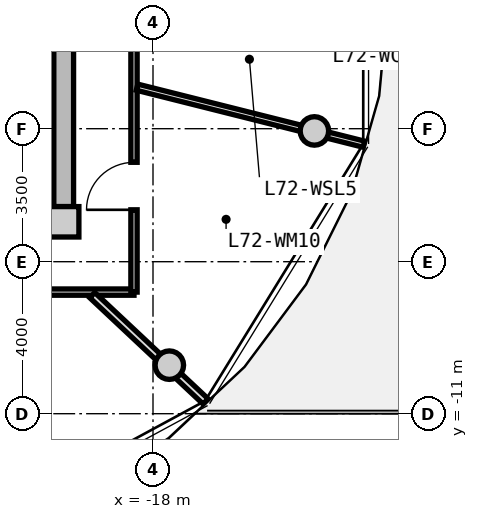
"""IFC4 building model, lengths in metres.
Left out: names, types, materials, properties, quantities, classifications, styles, units other than length and angle.
Written with IfcOpenShell. Run it as: python <this file> out.ifc"""

import sys

from ifc_helpers import new_model, si_unit, direction, frame, frame_2d, origin, origin_2d, place, context, subcontext, project, spatial, rectangle, circle, extrude, source, transform, mapped, element, fill, save


model = new_model("IFC4")
c1 = context("Model", 3, precision=1e-05, world=origin(), true_north=direction((0.0, 1.0)))
c2 = subcontext(c1, "Body", "Model", "MODEL_VIEW")
j1 = project(units=[si_unit("LENGTHUNIT", "METRE"), si_unit("PLANEANGLEUNIT", "RADIAN")], contexts=[c1])
p1 = place(None, origin())
s1 = spatial("IfcSite", under=j1, at=p1, CompositionType="ELEMENT")
p2 = place(p1, origin())
s2 = spatial("IfcBuilding", under=s1, at=p2, CompositionType="ELEMENT")
p3 = place(p2, frame((0.0, 0.0, 232.2)))
s3 = spatial("IfcBuildingStorey", under=s2, at=p3, CompositionType="ELEMENT", Elevation=232.2)
m1 = source(origin(), c2, "Body", "SweptSolid", [
    extrude(rectangle(XDim=0.8, YDim=0.8, at=origin_2d()), origin(), (0.0, 0.0, 1.0), 3.05),
])
p4 = place(p3, frame((-20.35, -5.95, 0.0), z_axis=(0.0, 0.0, 1.0), x_axis=(1.0, 0.0, 0.0)))
e1 = element("IfcColumn", 1, at=p4, inside=s3, PredefinedType="COLUMN", context=c2, shape_type="MappedRepresentation", body=[
    mapped(m1, transform((0.0, 0.0, 0.0), x_axis=(1.0, 0.0, 0.0), y_axis=(0.0, 1.0, 0.0), z_axis=(0.0, 0.0, 1.0), scale=1.0)),
])
m2 = source(origin(), c2, "Body", "SweptSolid", [
    extrude(rectangle(XDim=11.1, YDim=0.52, at=frame_2d((5.55, 0.0))), origin(), (0.0, 0.0, 1.0), 2.81),
])
p5 = place(p3, frame((-20.35, 5.55, 0.0), z_axis=(0.0, 0.0, 1.0), x_axis=(0.0, -1.0, 0.0)))
e2 = element("IfcWall", 2, at=p5, inside=s3, PredefinedType="SHEAR", context=c2, shape_type="MappedRepresentation", body=[
    mapped(m2, transform((0.0, 0.0, 0.0), x_axis=(1.0, 0.0, 0.0), y_axis=(0.0, 1.0, 0.0), z_axis=(0.0, 0.0, 1.0), scale=1.0)),
])
p6 = place(p5, frame((5.65, 0.0, 0.0)))
e3 = element("IfcOpeningElement", 3, at=p6, cuts=e2, PredefinedType="OPENING", context=c2, shape_type="SweptSolid", body=[
    extrude(rectangle(XDim=1.2, YDim=2.15, at=frame_2d((0.6, 1.075))), frame((0.0, 0.27, 0.0), z_axis=(0.0, -1.0, 0.0), x_axis=(1.0, 0.0, 0.0)), (0.0, 0.0, 1.0), 0.54),
])
m3 = source(origin(), c2, "Body", "SweptSolid", [
    extrude(circle(Radius=0.375, at=origin_2d()), origin(), (0.0, 0.0, 1.0), 3.05),
])
for number, where, z_axis, x_axis in (
    (4, (-17.57, -9.723, 0.0), (0.0, 0.0, 1.0), (1.0, 0.0, 0.0)),
    (5, (-13.753, -3.559, 0.0), (0.0, 0.0, 1.0), (1.0, 0.0, 0.0)),
):
    element("IfcColumn", number, at=place(p3, frame(where, z_axis=z_axis, x_axis=x_axis)), inside=s3, PredefinedType="COLUMN", context=c2, shape_type="MappedRepresentation", body=[
        mapped(m3, transform((0.0, 0.0, 0.0), x_axis=(1.0, 0.0, 0.0), y_axis=(0.0, 1.0, 0.0), z_axis=(0.0, 0.0, 1.0), scale=1.0)),
    ])
m4 = source(origin(), c2, "Body", "SweptSolid", [
    extrude(rectangle(XDim=19.0, YDim=0.165, at=frame_2d((9.5, 0.0))), origin(), (0.0, 0.0, 1.0), 2.795),
])
p7 = place(p3, frame((-18.5, -7.8, 0.0), z_axis=(0.0, 0.0, 1.0), x_axis=(-1.0, 0.0, 0.0)))
e6 = element("IfcWall", 6, at=p7, inside=s3, PredefinedType="PARTITIONING", context=c2, shape_type="MappedRepresentation", body=[
    mapped(m4, transform((0.0, 0.0, 0.0), x_axis=(1.0, 0.0, 0.0), y_axis=(0.0, 1.0, 0.0), z_axis=(0.0, 0.0, 1.0), scale=1.0)),
])
p8 = place(p7, frame((15.586, 0.0, 0.0)))
e7 = element("IfcOpeningElement", 7, at=p8, cuts=e6, PredefinedType="OPENING", context=c2, shape_type="SweptSolid", body=[
    extrude(rectangle(XDim=1.05, YDim=2.15, at=frame_2d((0.525, 1.075))), frame((0.0, 0.093, 0.0), z_axis=(0.0, -1.0, 0.0), x_axis=(1.0, 0.0, 0.0)), (0.0, 0.0, 1.0), 0.185),
])
p9 = place(p7, frame((12.465, 0.0, 0.0)))
e8 = element("IfcOpeningElement", 8, at=p9, cuts=e6, PredefinedType="OPENING", context=c2, shape_type="SweptSolid", body=[
    extrude(rectangle(XDim=1.05, YDim=2.15, at=frame_2d((0.525, 1.075))), frame((0.0, 0.093, 0.0), z_axis=(0.0, -1.0, 0.0), x_axis=(1.0, 0.0, 0.0)), (0.0, 0.0, 1.0), 0.185),
])
p10 = place(p7, frame((8.875, 0.0, 0.0)))
e9 = element("IfcOpeningElement", 9, at=p10, cuts=e6, PredefinedType="OPENING", context=c2, shape_type="SweptSolid", body=[
    extrude(rectangle(XDim=1.25, YDim=2.2, at=frame_2d((0.625, 1.1))), frame((0.0, 0.093, 0.0), z_axis=(0.0, -1.0, 0.0), x_axis=(1.0, 0.0, 0.0)), (0.0, 0.0, 1.0), 0.185),
])
p11 = place(p7, frame((3.559, 0.0, 0.0)))
e10 = element("IfcOpeningElement", 10, at=p11, cuts=e6, PredefinedType="OPENING", context=c2, shape_type="SweptSolid", body=[
    extrude(rectangle(XDim=1.25, YDim=2.2, at=frame_2d((0.625, 1.1))), frame((0.0, 0.093, 0.0), z_axis=(0.0, -1.0, 0.0), x_axis=(1.0, 0.0, 0.0)), (0.0, 0.0, 1.0), 0.185),
])
m5 = source(origin(), c2, "Body", "SweptSolid", [
    extrude(rectangle(XDim=6.88, YDim=0.165, at=frame_2d((3.44, 0.0))), origin(), (0.0, 0.0, 1.0), 2.795),
])
p12 = place(p3, frame((-18.5, -0.92, 0.0), z_axis=(0.0, 0.0, 1.0), x_axis=(0.0, -1.0, 0.0)))
e11 = element("IfcWall", 11, at=p12, inside=s3, PredefinedType="PARTITIONING", context=c2, shape_type="MappedRepresentation", body=[
    mapped(m5, transform((0.0, 0.0, 0.0), x_axis=(1.0, 0.0, 0.0), y_axis=(0.0, 1.0, 0.0), z_axis=(0.0, 0.0, 1.0), scale=1.0)),
])
p13 = place(p12, frame((3.464, 0.0, 0.0)))
e12 = element("IfcOpeningElement", 12, at=p13, cuts=e11, PredefinedType="OPENING", context=c2, shape_type="SweptSolid", body=[
    extrude(rectangle(XDim=1.25, YDim=2.2, at=frame_2d((0.625, 1.1))), frame((0.0, 0.093, 0.0), z_axis=(0.0, -1.0, 0.0), x_axis=(1.0, 0.0, 0.0)), (0.0, 0.0, 1.0), 0.185),
])
m6 = source(origin(), c2, "Body", "SweptSolid", [
    extrude(rectangle(XDim=6.157, YDim=0.165, at=frame_2d((3.079, 0.0))), origin(), (0.0, 0.0, 1.0), 2.395),
])
p14 = place(p3, frame((-18.42, -2.407, 0.0), z_axis=(0.0, 0.0, 1.0), x_axis=(0.969840867184, -0.243738984038, 0.0)))
e13 = element("IfcWall", 13, at=p14, inside=s3, PredefinedType="PARTITIONING", context=c2, shape_type="MappedRepresentation", body=[
    mapped(m6, transform((0.0, 0.0, 0.0), x_axis=(1.0, 0.0, 0.0), y_axis=(0.0, 1.0, 0.0), z_axis=(0.0, 0.0, 1.0), scale=1.0)),
])
m7 = source(origin(), c2, "Body", "SweptSolid", [
    extrude(rectangle(XDim=4.089, YDim=0.19, at=frame_2d((2.044, 0.0))), origin(), (0.0, 0.0, 1.0), 2.395),
])
p15 = place(p3, frame((-19.598, -7.88, 0.0), z_axis=(0.0, 0.0, 1.0), x_axis=(0.729401273609, -0.684086092577, 0.0)))
e14 = element("IfcWall", 14, at=p15, inside=s3, PredefinedType="PARTITIONING", context=c2, shape_type="MappedRepresentation", body=[
    mapped(m7, transform((0.0, 0.0, 0.0), x_axis=(1.0, 0.0, 0.0), y_axis=(0.0, 1.0, 0.0), z_axis=(0.0, 0.0, 1.0), scale=1.0)),
])
m8 = source(origin(), c2, "Body", "SweptSolid", [
    extrude(rectangle(XDim=1.25, YDim=2.2, at=frame_2d((0.625, 1.1))), frame((0.0, 0.025, 0.0), z_axis=(0.0, -1.0, 0.0), x_axis=(1.0, 0.0, 0.0)), (0.0, 0.0, 1.0), 0.05),
])
p16 = place(p13, frame((1.25, 0.0, 0.0), z_axis=(0.0, 0.0, 1.0), x_axis=(-1.0, 0.0, 0.0)))
e15 = element("IfcDoor", 15, at=p16, inside=s3, OperationType="SINGLE_SWING_LEFT", PredefinedType="DOOR", context=c2, shape_type="MappedRepresentation", body=[
    mapped(m8, transform((0.0, 0.0, 0.0), x_axis=(1.0, 0.0, 0.0), y_axis=(0.0, 1.0, 0.0), z_axis=(0.0, 0.0, 1.0), scale=1.0)),
])
fill(e12, e15)
save(model, sys.argv[1])
